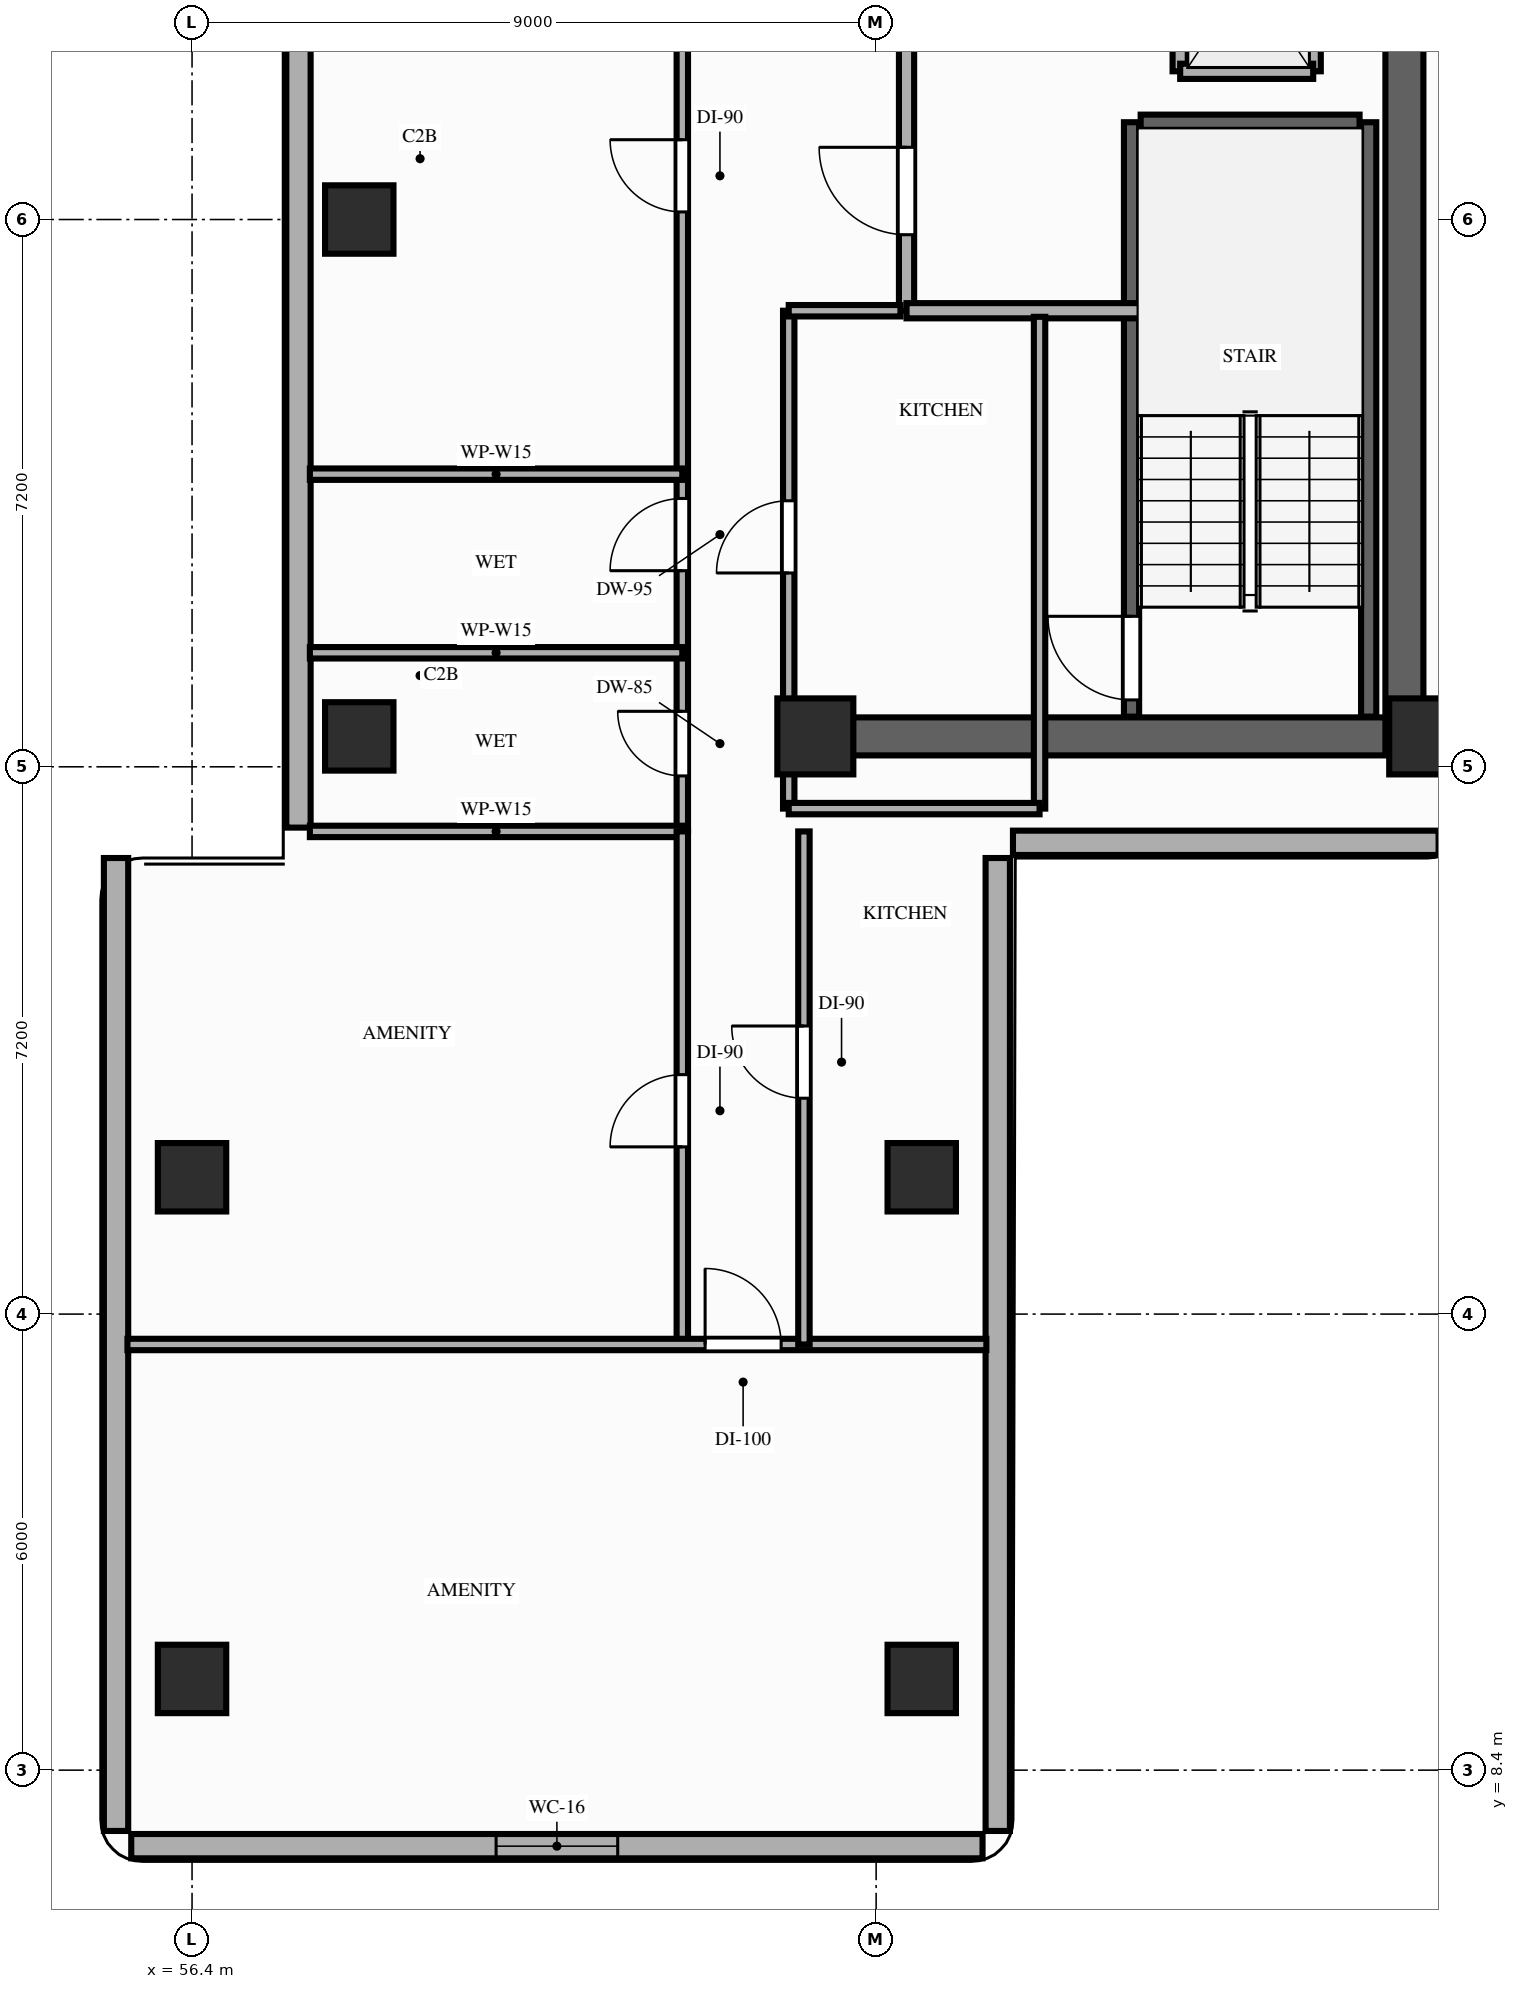
"""IFC4 building model, lengths in metres.
Left out: names, types, materials, properties, quantities, classifications, styles, units other than length and angle.
Written with IfcOpenShell. Run it as: python <this file> out.ifc"""

import sys

from ifc_helpers import new_model, si_unit, direction, frame, frame_2d, origin, origin_2d, place, context, subcontext, project, spatial, rectangle, extrude, element, fill, save


model = new_model("IFC4")
c1 = context("Model", 3, precision=1e-05, world=origin(), true_north=direction((0.0, 1.0)))
c2 = subcontext(c1, "Body", "Model", "MODEL_VIEW")
j1 = project(units=[si_unit("LENGTHUNIT", "METRE"), si_unit("PLANEANGLEUNIT", "RADIAN")], contexts=[c1])
p1 = place(None, origin())
s1 = spatial("IfcSite", under=j1, at=p1, CompositionType="ELEMENT")
p2 = place(p1, origin())
s2 = spatial("IfcBuilding", under=s1, at=p2, CompositionType="ELEMENT")
p3 = place(p2, frame((0.0, 0.0, 59.6)))
s3 = spatial("IfcBuildingStorey", under=s2, at=p3, CompositionType="ELEMENT", Elevation=59.6)
for number, where, z_axis, x_axis in (
    (1, (64.6, 22.0, 0.0), (0.0, 0.0, 1.0), (1.0, 0.0, 0.0)),
    (2, (72.65, 22.0, 0.0), (0.0, 0.0, 1.0), (1.0, 0.0, 0.0)),
):
    element("IfcColumn", number, at=place(p3, frame(where, z_axis=z_axis, x_axis=x_axis)), inside=s3, PredefinedType="COLUMN", context=c2, shape_type="SweptSolid", body=[
        extrude(rectangle(XDim=1.0, YDim=1.0, at=origin_2d()), origin(), (0.0, 0.0, 1.0), 3.2),
    ])
for number, where, z_axis, x_axis in (
    (3, (58.6, 22.0, 0.0), (0.0, 0.0, 1.0), (1.0, 0.0, 0.0)),
    (4, (58.6, 28.8, 0.0), (0.0, 0.0, 1.0), (1.0, 0.0, 0.0)),
    (5, (56.4, 9.6, 0.0), (0.0, 0.0, 1.0), (1.0, 0.0, 0.0)),
    (6, (56.4, 16.2, 0.0), (0.0, 0.0, 1.0), (1.0, 0.0, 0.0)),
    (7, (66.0, 9.6, 0.0), (0.0, 0.0, 1.0), (1.0, 0.0, 0.0)),
    (8, (66.0, 16.2, 0.0), (0.0, 0.0, 1.0), (1.0, 0.0, 0.0)),
):
    element("IfcColumn", number, at=place(p3, frame(where, z_axis=z_axis, x_axis=x_axis)), inside=s3, PredefinedType="COLUMN", context=c2, shape_type="SweptSolid", body=[
        extrude(rectangle(XDim=0.9, YDim=0.9, at=origin_2d()), origin(), (0.0, 0.0, 1.0), 3.2),
    ])
p4 = place(p3, frame((57.8, 43.4, 0.0), z_axis=(0.0, 0.0, 1.0), x_axis=(0.0, -1.0, 0.0)))
e9 = element("IfcWall", 9, at=p4, inside=s3, PredefinedType="STANDARD", context=c2, shape_type="SweptSolid", body=[
    extrude(rectangle(XDim=22.6, YDim=0.32, at=frame_2d((11.3, 0.0))), origin(), (0.0, 0.0, 1.0), 2.5),
])
p5 = place(p4, frame((3.7, 0.0, 0.0)))
e10 = element("IfcOpeningElement", 10, at=p5, cuts=e9, PredefinedType="OPENING", context=c2, shape_type="SweptSolid", body=[
    extrude(rectangle(XDim=1.4, YDim=2.1, at=frame_2d((0.7, 1.05))), frame((0.0, 0.17, 0.0), z_axis=(0.0, -1.0, 0.0), x_axis=(1.0, 0.0, 0.0)), (0.0, 0.0, 1.0), 0.34),
])
p6 = place(p3, frame((55.6, 7.4, 0.0), z_axis=(0.0, 0.0, 1.0), x_axis=(1.0, 0.0, 0.0)))
e11 = element("IfcWall", 11, at=p6, inside=s3, PredefinedType="STANDARD", context=c2, shape_type="SweptSolid", body=[
    extrude(rectangle(XDim=11.2, YDim=0.32, at=frame_2d((5.6, 0.0))), origin(), (0.0, 0.0, 1.0), 3.02),
])
p7 = place(p6, frame((4.8, 0.0, 0.85)))
e12 = element("IfcOpeningElement", 12, at=p7, cuts=e11, PredefinedType="OPENING", context=c2, shape_type="SweptSolid", body=[
    extrude(rectangle(XDim=1.6, YDim=1.7, at=frame_2d((0.8, 0.85))), frame((0.0, 0.17, 0.0), z_axis=(0.0, -1.0, 0.0), x_axis=(1.0, 0.0, 0.0)), (0.0, 0.0, 1.0), 0.34),
])
for number, where, z_axis, x_axis in (
    (13, (55.4, 20.4, 0.0), (0.0, 0.0, 1.0), (0.0, -1.0, 0.0)),
    (14, (67.0, 7.6, 0.0), (0.0, 0.0, 1.0), (0.0, 1.0, 0.0)),
):
    element("IfcWall", number, at=place(p3, frame(where, z_axis=z_axis, x_axis=x_axis)), inside=s3, PredefinedType="STANDARD", context=c2, shape_type="SweptSolid", body=[
        extrude(rectangle(XDim=12.8, YDim=0.32, at=frame_2d((6.4, 0.0))), origin(), (0.0, 0.0, 1.0), 3.02),
    ])
p8 = place(p3, frame((67.2, 20.6, 0.0), z_axis=(0.0, 0.0, 1.0), x_axis=(1.0, 0.0, 0.0)))
e15 = element("IfcWall", 15, at=p8, inside=s3, PredefinedType="STANDARD", context=c2, shape_type="SweptSolid", body=[
    extrude(rectangle(XDim=5.6, YDim=0.32, at=frame_2d((2.8, 0.0))), origin(), (0.0, 0.0, 1.0), 3.02),
])
p9 = place(p3, frame((72.35, 22.0, 0.0), z_axis=(0.0, 0.0, 1.0), x_axis=(0.0, 1.0, 0.0)))
e16 = element("IfcWall", 16, at=p9, inside=s3, PredefinedType="SHEAR", context=c2, shape_type="SweptSolid", body=[
    extrude(rectangle(XDim=20.25, YDim=0.5, at=frame_2d((10.125, 0.0))), origin(), (0.0, 0.0, 1.0), 3.02),
])
p10 = place(p3, frame((64.6, 22.0, 0.0), z_axis=(0.0, 0.0, 1.0), x_axis=(1.0, 0.0, 0.0)))
e17 = element("IfcWall", 17, at=p10, inside=s3, PredefinedType="SHEAR", context=c2, shape_type="SweptSolid", body=[
    extrude(rectangle(XDim=7.5, YDim=0.5, at=frame_2d((3.75, 0.0))), origin(), (0.0, 0.0, 1.0), 3.02),
])
p11 = place(p3, frame((68.76, 22.26, 0.0), z_axis=(0.0, 0.0, 1.0), x_axis=(0.0, 1.0, 0.0)))
e18 = element("IfcWall", 18, at=p11, inside=s3, PredefinedType="SHEAR", context=c2, shape_type="SweptSolid", body=[
    extrude(rectangle(XDim=7.82, YDim=0.2, at=frame_2d((3.91, 0.0))), origin(), (0.0, 0.0, 1.0), 3.02),
])
p12 = place(p11, frame((0.22, 0.0, 0.0)))
e19 = element("IfcOpeningElement", 19, at=p12, cuts=e18, PredefinedType="OPENING", context=c2, shape_type="SweptSolid", body=[
    extrude(rectangle(XDim=1.1, YDim=2.15, at=frame_2d((0.55, 1.075))), frame((0.0, 0.11, 0.0), z_axis=(0.0, -1.0, 0.0), x_axis=(1.0, 0.0, 0.0)), (0.0, 0.0, 1.0), 0.22),
])
p13 = place(p3, frame((71.88, 22.26, 0.0), z_axis=(0.0, 0.0, 1.0), x_axis=(0.0, 1.0, 0.0)))
e20 = element("IfcWall", 20, at=p13, inside=s3, PredefinedType="SHEAR", context=c2, shape_type="SweptSolid", body=[
    extrude(rectangle(XDim=7.82, YDim=0.2, at=frame_2d((3.91, 0.0))), origin(), (0.0, 0.0, 1.0), 3.02),
])
p14 = place(p3, frame((68.88, 30.08, 0.0), z_axis=(0.0, 0.0, 1.0), x_axis=(1.0, 0.0, 0.0)))
e21 = element("IfcWall", 21, at=p14, inside=s3, PredefinedType="SHEAR", context=c2, shape_type="SweptSolid", body=[
    extrude(rectangle(XDim=2.88, YDim=0.2, at=frame_2d((1.44, 0.0))), origin(), (0.0, 0.0, 1.0), 3.02),
])
p15 = place(p3, frame((69.4, 30.75, 0.0), z_axis=(0.0, 0.0, 1.0), x_axis=(0.0, 1.0, 0.0)))
e22 = element("IfcWall", 22, at=p15, inside=s3, PredefinedType="MOVABLE", context=c2, shape_type="SweptSolid", body=[
    extrude(rectangle(XDim=2.45, YDim=0.2, at=frame_2d((1.225, 0.0))), origin(), (0.0, 0.0, 1.0), 3.02),
])
p16 = place(p15, frame((0.65, 0.0, 0.0)))
e23 = element("IfcOpeningElement", 23, at=p16, cuts=e22, PredefinedType="OPENING", context=c2, shape_type="SweptSolid", body=[
    extrude(rectangle(XDim=1.05, YDim=2.15, at=frame_2d((0.525, 1.075))), frame((0.0, 0.11, 0.0), z_axis=(0.0, -1.0, 0.0), x_axis=(1.0, 0.0, 0.0)), (0.0, 0.0, 1.0), 0.22),
])
p17 = place(p3, frame((71.15, 30.75, 0.0), z_axis=(0.0, 0.0, 1.0), x_axis=(0.0, 1.0, 0.0)))
e24 = element("IfcWall", 24, at=p17, inside=s3, PredefinedType="MOVABLE", context=c2, shape_type="SweptSolid", body=[
    extrude(rectangle(XDim=2.45, YDim=0.2, at=frame_2d((1.225, 0.0))), origin(), (0.0, 0.0, 1.0), 3.02),
])
p18 = place(p3, frame((69.4, 30.75, 0.0), z_axis=(0.0, 0.0, 1.0), x_axis=(1.0, 0.0, 0.0)))
e25 = element("IfcWall", 25, at=p18, inside=s3, PredefinedType="MOVABLE", context=c2, shape_type="SweptSolid", body=[
    extrude(rectangle(XDim=1.75, YDim=0.2, at=frame_2d((0.875, 0.0))), origin(), (0.0, 0.0, 1.0), 3.02),
])
p19 = place(p3, frame((65.8, 27.6, 0.0), z_axis=(0.0, 0.0, 1.0), x_axis=(0.0, 1.0, 0.0)))
e26 = element("IfcWall", 26, at=p19, inside=s3, PredefinedType="PARTITIONING", context=c2, shape_type="SweptSolid", body=[
    extrude(rectangle(XDim=5.5, YDim=0.2, at=frame_2d((2.75, 0.0))), origin(), (0.0, 0.0, 1.0), 3.02),
])
p20 = place(p19, frame((1.0, 0.0, 0.0)))
e27 = element("IfcOpeningElement", 27, at=p20, cuts=e26, PredefinedType="OPENING", context=c2, shape_type="SweptSolid", body=[
    extrude(rectangle(XDim=1.15, YDim=2.15, at=frame_2d((0.575, 1.075))), frame((0.0, 0.11, 0.0), z_axis=(0.0, -1.0, 0.0), x_axis=(1.0, 0.0, 0.0)), (0.0, 0.0, 1.0), 0.22),
])
p21 = place(p3, frame((65.8, 27.6, 0.0), z_axis=(0.0, 0.0, 1.0), x_axis=(1.0, 0.0, 0.0)))
e28 = element("IfcWall", 28, at=p21, inside=s3, PredefinedType="PARTITIONING", context=c2, shape_type="SweptSolid", body=[
    extrude(rectangle(XDim=3.4, YDim=0.2, at=frame_2d((1.7, 0.0))), origin(), (0.0, 0.0, 1.0), 3.02),
])
p22 = place(p3, frame((64.25, 21.05, 0.0), z_axis=(0.0, 0.0, 1.0), x_axis=(0.0, 1.0, 0.0)))
e29 = element("IfcWall", 29, at=p22, inside=s3, PredefinedType="PARTITIONING", context=c2, shape_type="SweptSolid", body=[
    extrude(rectangle(XDim=6.55, YDim=0.15, at=frame_2d((3.275, 0.0))), origin(), (0.0, 0.0, 1.0), 2.5),
])
p23 = place(p22, frame((3.1, 0.0, 0.0)))
e30 = element("IfcOpeningElement", 30, at=p23, cuts=e29, PredefinedType="OPENING", context=c2, shape_type="SweptSolid", body=[
    extrude(rectangle(XDim=0.95, YDim=2.15, at=frame_2d((0.475, 1.075))), frame((0.0, 0.085, 0.0), z_axis=(0.0, -1.0, 0.0), x_axis=(1.0, 0.0, 0.0)), (0.0, 0.0, 1.0), 0.17),
])
p24 = place(p3, frame((67.55, 21.05, 0.0), z_axis=(0.0, 0.0, 1.0), x_axis=(0.0, 1.0, 0.0)))
e31 = element("IfcWall", 31, at=p24, inside=s3, PredefinedType="PARTITIONING", context=c2, shape_type="SweptSolid", body=[
    extrude(rectangle(XDim=6.47, YDim=0.15, at=frame_2d((3.235, 0.0))), origin(), (0.0, 0.0, 1.0), 2.5),
])
p25 = place(p3, frame((64.25, 21.05, 0.0), z_axis=(0.0, 0.0, 1.0), x_axis=(1.0, 0.0, 0.0)))
e32 = element("IfcWall", 32, at=p25, inside=s3, PredefinedType="PARTITIONING", context=c2, shape_type="SweptSolid", body=[
    extrude(rectangle(XDim=3.3, YDim=0.15, at=frame_2d((1.65, 0.0))), origin(), (0.0, 0.0, 1.0), 2.5),
])
p26 = place(p3, frame((64.25, 27.6, 0.0), z_axis=(0.0, 0.0, 1.0), x_axis=(1.0, 0.0, 0.0)))
e33 = element("IfcWall", 33, at=p26, inside=s3, PredefinedType="PARTITIONING", context=c2, shape_type="SweptSolid", body=[
    extrude(rectangle(XDim=1.47, YDim=0.15, at=frame_2d((0.735, 0.0))), origin(), (0.0, 0.0, 1.0), 2.5),
])
p27 = place(p3, frame((62.85, 20.75, 0.0), z_axis=(0.0, 0.0, 1.0), x_axis=(0.0, 1.0, 0.0)))
e34 = element("IfcWall", 34, at=p27, inside=s3, PredefinedType="PARTITIONING", context=c2, shape_type="SweptSolid", body=[
    extrude(rectangle(XDim=22.7, YDim=0.15, at=frame_2d((11.35, 0.0))), origin(), (0.0, 0.0, 1.0), 2.5),
])
p28 = place(p27, frame((0.73, 0.0, 0.0)))
e35 = element("IfcOpeningElement", 35, at=p28, cuts=e34, PredefinedType="OPENING", context=c2, shape_type="SweptSolid", body=[
    extrude(rectangle(XDim=0.85, YDim=2.1, at=frame_2d((0.425, 1.05))), frame((0.0, 0.085, 0.0), z_axis=(0.0, -1.0, 0.0), x_axis=(1.0, 0.0, 0.0)), (0.0, 0.0, 1.0), 0.17),
])
p29 = place(p27, frame((3.43, 0.0, 0.0)))
e36 = element("IfcOpeningElement", 36, at=p29, cuts=e34, PredefinedType="OPENING", context=c2, shape_type="SweptSolid", body=[
    extrude(rectangle(XDim=0.95, YDim=2.1, at=frame_2d((0.475, 1.05))), frame((0.0, 0.085, 0.0), z_axis=(0.0, -1.0, 0.0), x_axis=(1.0, 0.0, 0.0)), (0.0, 0.0, 1.0), 0.17),
])
p30 = place(p27, frame((8.15, 0.0, 0.0)))
e37 = element("IfcOpeningElement", 37, at=p30, cuts=e34, PredefinedType="OPENING", context=c2, shape_type="SweptSolid", body=[
    extrude(rectangle(XDim=0.95, YDim=2.15, at=frame_2d((0.475, 1.075))), frame((0.0, 0.085, 0.0), z_axis=(0.0, -1.0, 0.0), x_axis=(1.0, 0.0, 0.0)), (0.0, 0.0, 1.0), 0.17),
])
for number, where, z_axis, x_axis in (
    (38, (57.95, 20.75, 0.0), (0.0, 0.0, 1.0), (1.0, 0.0, 0.0)),
    (39, (57.95, 23.1, 0.0), (0.0, 0.0, 1.0), (1.0, 0.0, 0.0)),
    (40, (57.95, 25.45, 0.0), (0.0, 0.0, 1.0), (1.0, 0.0, 0.0)),
):
    element("IfcWall", number, at=place(p3, frame(where, z_axis=z_axis, x_axis=x_axis)), inside=s3, PredefinedType="PARTITIONING", context=c2, shape_type="SweptSolid", body=[
        extrude(rectangle(XDim=4.9, YDim=0.15, at=frame_2d((2.45, 0.0))), origin(), (0.0, 0.0, 1.0), 2.5),
    ])
p31 = place(p3, frame((62.85, 14.0, 0.0), z_axis=(0.0, 0.0, 1.0), x_axis=(0.0, 1.0, 0.0)))
e41 = element("IfcWall", 41, at=p31, inside=s3, PredefinedType="PARTITIONING", context=c2, shape_type="SweptSolid", body=[
    extrude(rectangle(XDim=6.75, YDim=0.15, at=frame_2d((3.375, 0.0))), origin(), (0.0, 0.0, 1.0), 2.5),
])
p32 = place(p31, frame((2.6, 0.0, 0.0)))
e42 = element("IfcOpeningElement", 42, at=p32, cuts=e41, PredefinedType="OPENING", context=c2, shape_type="SweptSolid", body=[
    extrude(rectangle(XDim=0.95, YDim=2.15, at=frame_2d((0.475, 1.075))), frame((0.0, 0.085, 0.0), z_axis=(0.0, -1.0, 0.0), x_axis=(1.0, 0.0, 0.0)), (0.0, 0.0, 1.0), 0.17),
])
p33 = place(p3, frame((55.55, 14.0, 0.0), z_axis=(0.0, 0.0, 1.0), x_axis=(1.0, 0.0, 0.0)))
e43 = element("IfcWall", 43, at=p33, inside=s3, PredefinedType="PARTITIONING", context=c2, shape_type="SweptSolid", body=[
    extrude(rectangle(XDim=11.3, YDim=0.15, at=frame_2d((5.65, 0.0))), origin(), (0.0, 0.0, 1.0), 2.5),
])
p34 = place(p33, frame((7.6, 0.0, 0.0)))
e44 = element("IfcOpeningElement", 44, at=p34, cuts=e43, PredefinedType="OPENING", context=c2, shape_type="SweptSolid", body=[
    extrude(rectangle(XDim=1.0, YDim=2.15, at=frame_2d((0.5, 1.075))), frame((0.0, 0.085, 0.0), z_axis=(0.0, -1.0, 0.0), x_axis=(1.0, 0.0, 0.0)), (0.0, 0.0, 1.0), 0.17),
])
p35 = place(p3, frame((64.45, 14.0, 0.0), z_axis=(0.0, 0.0, 1.0), x_axis=(0.0, 1.0, 0.0)))
e45 = element("IfcWall", 45, at=p35, inside=s3, PredefinedType="PARTITIONING", context=c2, shape_type="SweptSolid", body=[
    extrude(rectangle(XDim=6.75, YDim=0.15, at=frame_2d((3.375, 0.0))), origin(), (0.0, 0.0, 1.0), 2.5),
])
p36 = place(p35, frame((3.24, 0.0, 0.0)))
e46 = element("IfcOpeningElement", 46, at=p36, cuts=e45, PredefinedType="OPENING", context=c2, shape_type="SweptSolid", body=[
    extrude(rectangle(XDim=0.95, YDim=2.15, at=frame_2d((0.475, 1.075))), frame((0.0, 0.085, 0.0), z_axis=(0.0, -1.0, 0.0), x_axis=(1.0, 0.0, 0.0)), (0.0, 0.0, 1.0), 0.17),
])
p37 = place(p7, origin())
e47 = element("IfcWindow", 47, at=p37, inside=s3, PartitioningType="SINGLE_PANEL", PredefinedType="WINDOW", context=c2, shape_type="SweptSolid", body=[
    extrude(rectangle(XDim=1.6, YDim=1.7, at=frame_2d((0.8, 0.85))), frame((0.0, 0.03, 0.0), z_axis=(0.0, -1.0, 0.0), x_axis=(1.0, 0.0, 0.0)), (0.0, 0.0, 1.0), 0.06),
])
fill(e12, e47)
p38 = place(p12, origin())
e48 = element("IfcDoor", 48, at=p38, inside=s3, OperationType="SINGLE_SWING_RIGHT", PredefinedType="DOOR", context=c2, shape_type="SweptSolid", body=[
    extrude(rectangle(XDim=1.1, YDim=2.15, at=frame_2d((0.55, 1.075))), frame((0.0, 0.025, 0.0), z_axis=(0.0, -1.0, 0.0), x_axis=(1.0, 0.0, 0.0)), (0.0, 0.0, 1.0), 0.05),
])
fill(e19, e48)
p39 = place(p20, origin())
e49 = element("IfcDoor", 49, at=p39, inside=s3, OperationType="SINGLE_SWING_RIGHT", PredefinedType="DOOR", context=c2, shape_type="SweptSolid", body=[
    extrude(rectangle(XDim=1.15, YDim=2.15, at=frame_2d((0.575, 1.075))), frame((0.0, 0.025, 0.0), z_axis=(0.0, -1.0, 0.0), x_axis=(1.0, 0.0, 0.0)), (0.0, 0.0, 1.0), 0.05),
])
fill(e27, e49)
p40 = place(p23, origin())
e50 = element("IfcDoor", 50, at=p40, inside=s3, OperationType="SINGLE_SWING_LEFT", PredefinedType="DOOR", context=c2, shape_type="SweptSolid", body=[
    extrude(rectangle(XDim=0.95, YDim=2.15, at=frame_2d((0.475, 1.075))), frame((0.0, 0.025, 0.0), z_axis=(0.0, -1.0, 0.0), x_axis=(1.0, 0.0, 0.0)), (0.0, 0.0, 1.0), 0.05),
])
fill(e30, e50)
p41 = place(p28, origin())
e51 = element("IfcDoor", 51, at=p41, inside=s3, OperationType="SINGLE_SWING_RIGHT", PredefinedType="DOOR", context=c2, shape_type="SweptSolid", body=[
    extrude(rectangle(XDim=0.85, YDim=2.1, at=frame_2d((0.425, 1.05))), frame((0.0, 0.025, 0.0), z_axis=(0.0, -1.0, 0.0), x_axis=(1.0, 0.0, 0.0)), (0.0, 0.0, 1.0), 0.05),
])
fill(e35, e51)
p42 = place(p29, origin())
e52 = element("IfcDoor", 52, at=p42, inside=s3, OperationType="SINGLE_SWING_LEFT", PredefinedType="DOOR", context=c2, shape_type="SweptSolid", body=[
    extrude(rectangle(XDim=0.95, YDim=2.1, at=frame_2d((0.475, 1.05))), frame((0.0, 0.025, 0.0), z_axis=(0.0, -1.0, 0.0), x_axis=(1.0, 0.0, 0.0)), (0.0, 0.0, 1.0), 0.05),
])
fill(e36, e52)
p43 = place(p30, origin())
e53 = element("IfcDoor", 53, at=p43, inside=s3, OperationType="SINGLE_SWING_RIGHT", PredefinedType="DOOR", context=c2, shape_type="SweptSolid", body=[
    extrude(rectangle(XDim=0.95, YDim=2.15, at=frame_2d((0.475, 1.075))), frame((0.0, 0.025, 0.0), z_axis=(0.0, -1.0, 0.0), x_axis=(1.0, 0.0, 0.0)), (0.0, 0.0, 1.0), 0.05),
])
fill(e37, e53)
p44 = place(p32, origin())
e54 = element("IfcDoor", 54, at=p44, inside=s3, OperationType="SINGLE_SWING_LEFT", PredefinedType="DOOR", context=c2, shape_type="SweptSolid", body=[
    extrude(rectangle(XDim=0.95, YDim=2.15, at=frame_2d((0.475, 1.075))), frame((0.0, 0.025, 0.0), z_axis=(0.0, -1.0, 0.0), x_axis=(1.0, 0.0, 0.0)), (0.0, 0.0, 1.0), 0.05),
])
fill(e42, e54)
p45 = place(p36, origin())
e55 = element("IfcDoor", 55, at=p45, inside=s3, OperationType="SINGLE_SWING_RIGHT", PredefinedType="DOOR", context=c2, shape_type="SweptSolid", body=[
    extrude(rectangle(XDim=0.95, YDim=2.15, at=frame_2d((0.475, 1.075))), frame((0.0, 0.025, 0.0), z_axis=(0.0, -1.0, 0.0), x_axis=(1.0, 0.0, 0.0)), (0.0, 0.0, 1.0), 0.05),
])
fill(e46, e55)
p46 = place(p34, origin())
e56 = element("IfcDoor", 56, at=p46, inside=s3, OperationType="SINGLE_SWING_LEFT", PredefinedType="DOOR", context=c2, shape_type="SweptSolid", body=[
    extrude(rectangle(XDim=1.0, YDim=2.15, at=frame_2d((0.5, 1.075))), frame((0.0, 0.025, 0.0), z_axis=(0.0, -1.0, 0.0), x_axis=(1.0, 0.0, 0.0)), (0.0, 0.0, 1.0), 0.05),
])
fill(e44, e56)
save(model, sys.argv[1])
